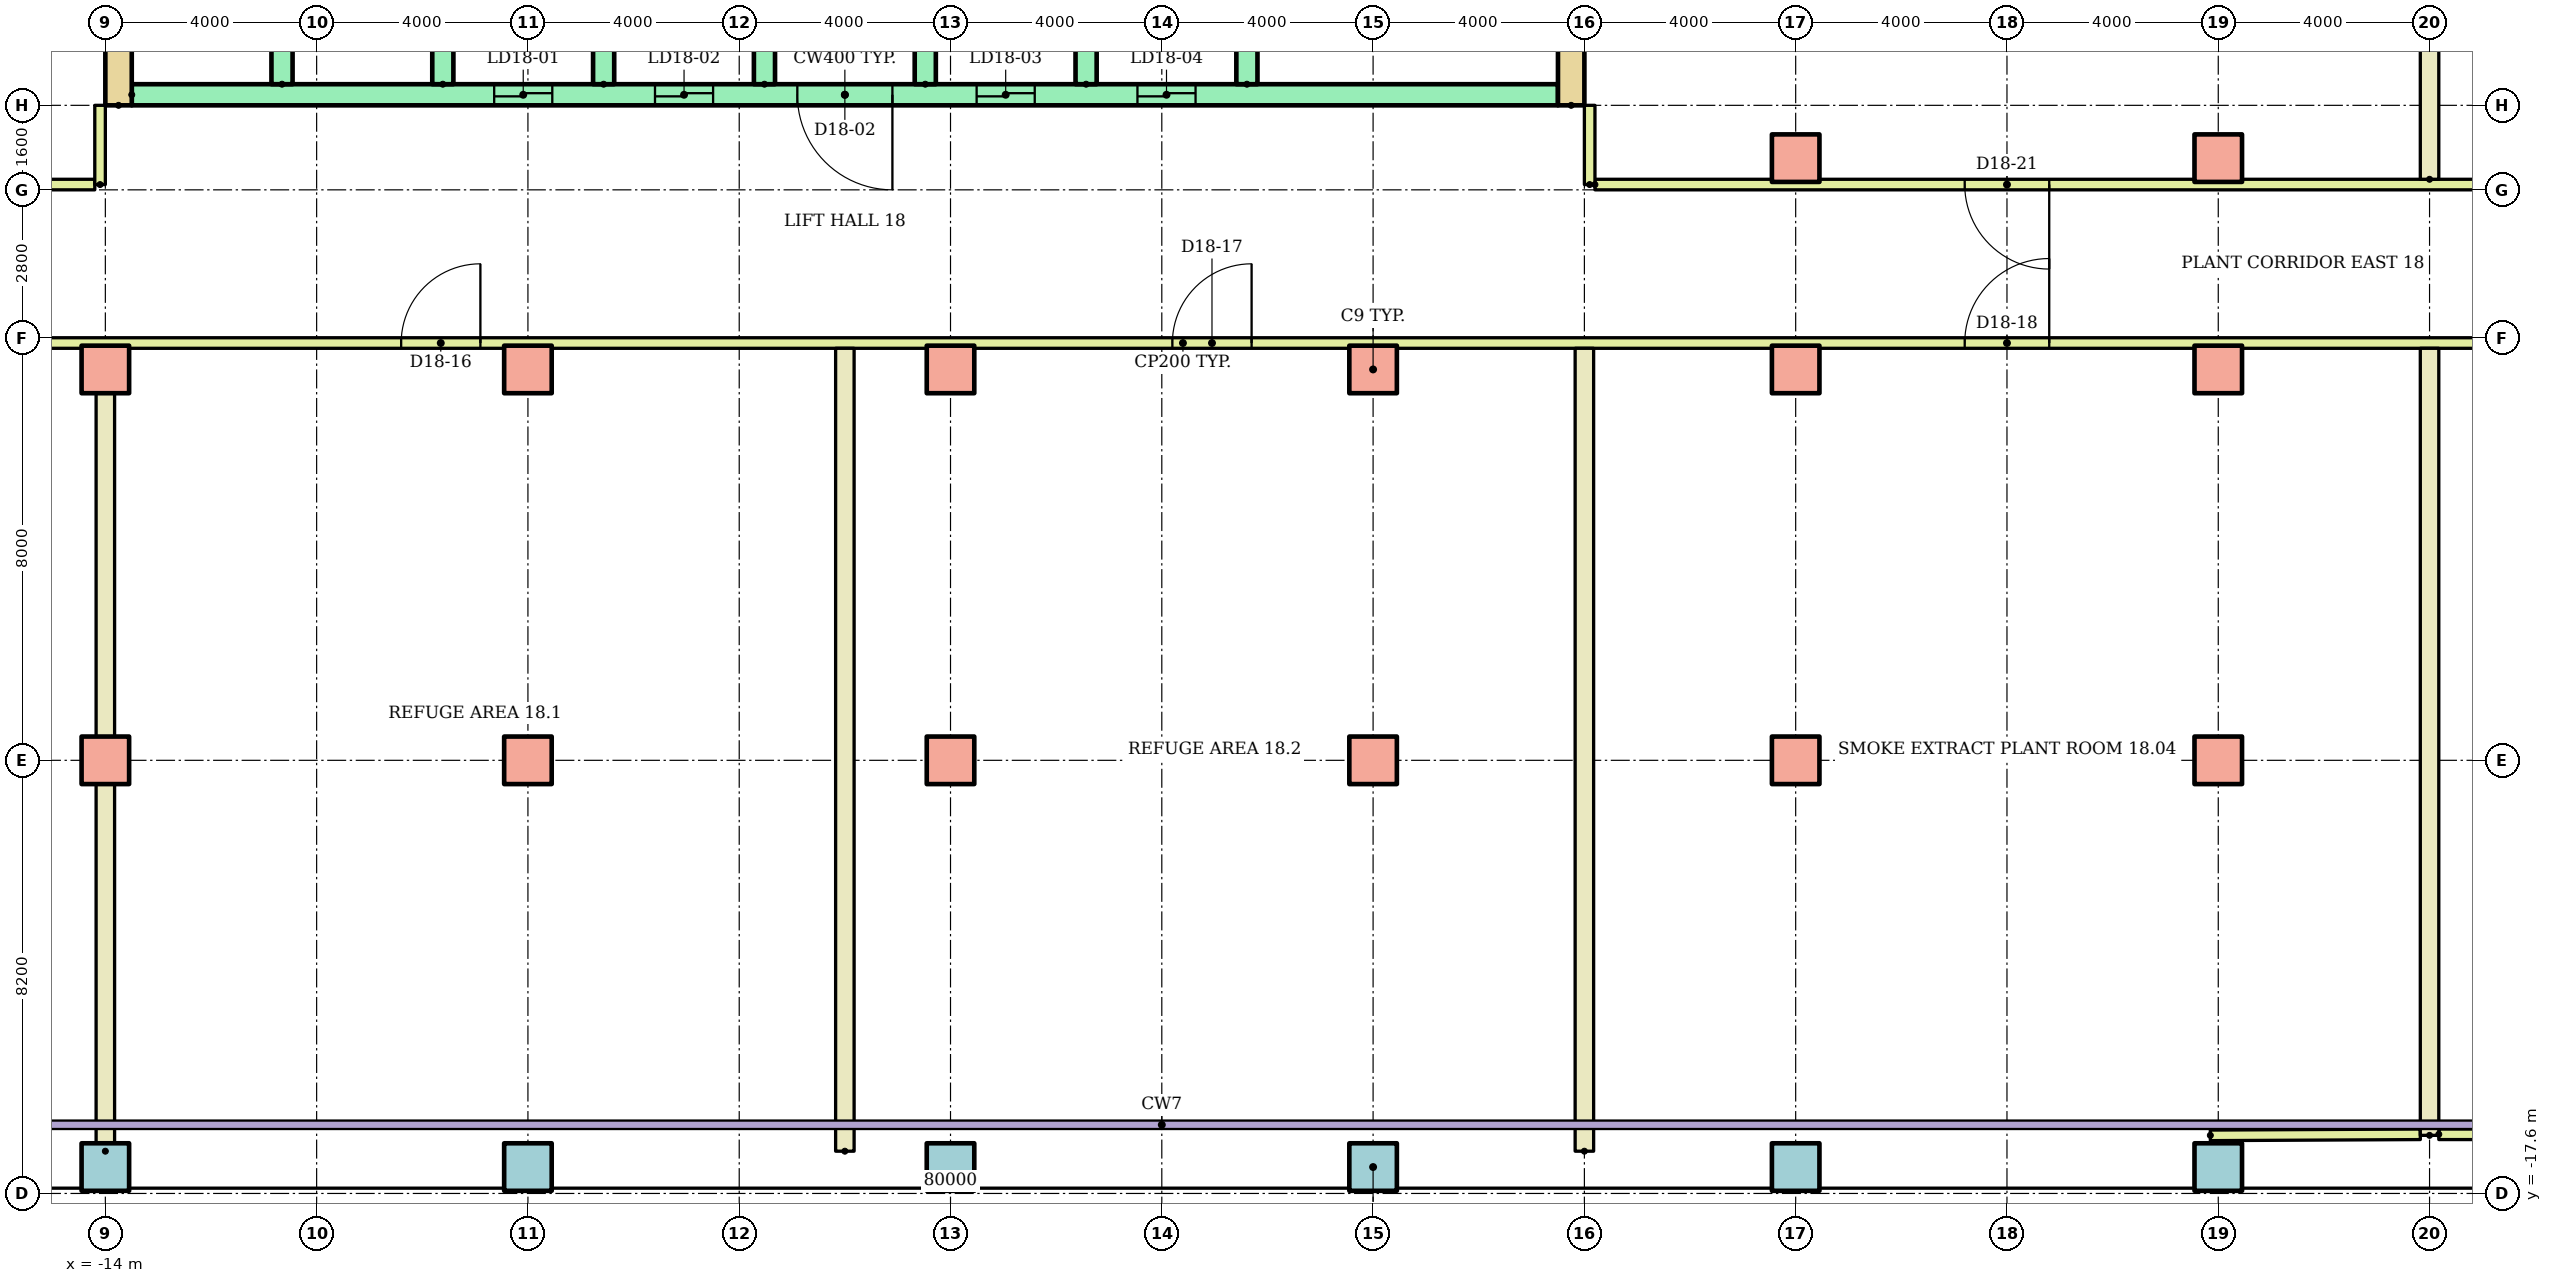
"""IFC4 building model, lengths in metres.
Left out: names, types, materials, properties, quantities, classifications, styles, units other than length and angle.
Written with IfcOpenShell. Run it as: python <this file> out.ifc"""

import sys

from ifc_helpers import new_model, si_unit, direction, frame, frame_2d, origin, origin_2d, place, context, subcontext, project, spatial, rectangle, hollow_rectangle, extrude, element, fill, save


model = new_model("IFC4")
c1 = context("Model", 3, precision=1e-05, world=origin(), true_north=direction((0.0, 1.0)))
c2 = subcontext(c1, "Body", "Model", "MODEL_VIEW")
j1 = project(units=[si_unit("LENGTHUNIT", "METRE"), si_unit("PLANEANGLEUNIT", "RADIAN")], contexts=[c1])
p1 = place(None, origin())
s1 = spatial("IfcSite", under=j1, at=p1, CompositionType="ELEMENT")
p2 = place(p1, origin())
s2 = spatial("IfcBuilding", under=s1, at=p2, CompositionType="ELEMENT")
p3 = place(p2, frame((0.0, 0.0, 73.6)))
s3 = spatial("IfcBuildingStorey", under=s2, at=p3, CompositionType="ELEMENT", Elevation=73.6)
for number, where in (
    (1, (-14.0, -17.1, 0.0)),
    (2, (-6.0, -17.1, 0.0)),
    (3, (2.0, -17.1, 0.0)),
    (4, (10.0, -17.1, 0.0)),
    (5, (18.0, -17.1, 0.0)),
    (6, (26.0, -17.1, 0.0)),
):
    element("IfcColumn", number, at=place(p3, frame(where)), inside=s3, PredefinedType="COLUMN", context=c2, shape_type="SweptSolid", body=[
        extrude(hollow_rectangle(XDim=0.9, YDim=0.9, WallThickness=0.045, at=origin_2d()), origin(), (0.0, 0.0, 1.0), 3.9),
    ])
for number, where in (
    (7, (-14.0, -9.4, 0.0)),
    (8, (-6.0, -9.4, 0.0)),
    (9, (2.0, -9.4, 0.0)),
    (10, (10.0, -9.4, 0.0)),
    (11, (18.0, -9.4, 0.0)),
    (12, (26.0, -9.4, 0.0)),
    (13, (-14.0, -2.0, 0.0)),
    (14, (-6.0, -2.0, 0.0)),
    (15, (2.0, -2.0, 0.0)),
    (16, (10.0, -2.0, 0.0)),
    (17, (18.0, -2.0, 0.0)),
    (18, (26.0, -2.0, 0.0)),
    (19, (18.0, 2.0, 0.0)),
    (20, (26.0, 2.0, 0.0)),
):
    element("IfcColumn", number, at=place(p3, frame(where)), inside=s3, PredefinedType="COLUMN", context=c2, shape_type="SweptSolid", body=[
        extrude(rectangle(XDim=0.9, YDim=0.9, at=origin_2d()), origin(), (0.0, 0.0, 1.0), 3.9),
    ])
for number, where, z_axis, x_axis in (
    (21, (-13.75, 3.0, 0.0), (0.0, 0.0, 1.0), (0.0, 1.0, 0.0)),
    (22, (13.75, 3.0, 0.0), (0.0, 0.0, 1.0), (0.0, 1.0, 0.0)),
):
    element("IfcWall", number, at=place(p3, frame(where, z_axis=z_axis, x_axis=x_axis)), inside=s3, PredefinedType="SHEAR", context=c2, shape_type="SweptSolid", body=[
        extrude(rectangle(XDim=17.0, YDim=0.5, at=frame_2d((8.5, 0.0))), origin(), (0.0, 0.0, 1.0), 3.62),
    ])
p4 = place(p3, frame((-13.5, 3.2, 0.0)))
e23 = element("IfcWall", 23, at=p4, inside=s3, PredefinedType="SHEAR", context=c2, shape_type="SweptSolid", body=[
    extrude(rectangle(XDim=27.0, YDim=0.4, at=frame_2d((13.5, 0.0))), origin(), (0.0, 0.0, 1.0), 3.62),
])
p5 = place(p4, frame((6.861, 0.0, 0.0)))
e24 = element("IfcOpeningElement", 24, at=p5, cuts=e23, PredefinedType="OPENING", context=c2, shape_type="SweptSolid", body=[
    extrude(rectangle(XDim=1.1, YDim=2.1, at=frame_2d((0.55, 1.05))), frame((0.0, 0.21, 0.0), z_axis=(0.0, -1.0, 0.0), x_axis=(1.0, 0.0, 0.0)), (0.0, 0.0, 1.0), 0.42),
])
p6 = place(p4, frame((9.906, 0.0, 0.0)))
e25 = element("IfcOpeningElement", 25, at=p6, cuts=e23, PredefinedType="OPENING", context=c2, shape_type="SweptSolid", body=[
    extrude(rectangle(XDim=1.1, YDim=2.1, at=frame_2d((0.55, 1.05))), frame((0.0, 0.21, 0.0), z_axis=(0.0, -1.0, 0.0), x_axis=(1.0, 0.0, 0.0)), (0.0, 0.0, 1.0), 0.42),
])
p7 = place(p4, frame((15.994, 0.0, 0.0)))
e26 = element("IfcOpeningElement", 26, at=p7, cuts=e23, PredefinedType="OPENING", context=c2, shape_type="SweptSolid", body=[
    extrude(rectangle(XDim=1.1, YDim=2.1, at=frame_2d((0.55, 1.05))), frame((0.0, 0.21, 0.0), z_axis=(0.0, -1.0, 0.0), x_axis=(1.0, 0.0, 0.0)), (0.0, 0.0, 1.0), 0.42),
])
p8 = place(p4, frame((19.039, 0.0, 0.0)))
e27 = element("IfcOpeningElement", 27, at=p8, cuts=e23, PredefinedType="OPENING", context=c2, shape_type="SweptSolid", body=[
    extrude(rectangle(XDim=1.1, YDim=2.1, at=frame_2d((0.55, 1.05))), frame((0.0, 0.21, 0.0), z_axis=(0.0, -1.0, 0.0), x_axis=(1.0, 0.0, 0.0)), (0.0, 0.0, 1.0), 0.42),
])
p9 = place(p4, frame((12.6, 0.0, 0.0)))
e28 = element("IfcOpeningElement", 28, at=p9, cuts=e23, PredefinedType="OPENING", context=c2, shape_type="SweptSolid", body=[
    extrude(rectangle(XDim=1.8, YDim=2.1, at=frame_2d((0.9, 1.05))), frame((0.0, 0.21, 0.0), z_axis=(0.0, -1.0, 0.0), x_axis=(1.0, 0.0, 0.0)), (0.0, 0.0, 1.0), 0.42),
])
for number, where, z_axis, x_axis in (
    (29, (-10.656, 3.4, 0.0), (0.0, 0.0, 1.0), (0.0, 1.0, 0.0)),
    (30, (-7.611, 3.4, 0.0), (0.0, 0.0, 1.0), (0.0, 1.0, 0.0)),
    (31, (-4.567, 3.4, 0.0), (0.0, 0.0, 1.0), (0.0, 1.0, 0.0)),
    (32, (-1.522, 3.4, 0.0), (0.0, 0.0, 1.0), (0.0, 1.0, 0.0)),
    (33, (1.522, 3.4, 0.0), (0.0, 0.0, 1.0), (0.0, 1.0, 0.0)),
    (34, (4.567, 3.4, 0.0), (0.0, 0.0, 1.0), (0.0, 1.0, 0.0)),
    (35, (7.611, 3.4, 0.0), (0.0, 0.0, 1.0), (0.0, 1.0, 0.0)),
):
    element("IfcWall", number, at=place(p3, frame(where, z_axis=z_axis, x_axis=x_axis)), inside=s3, PredefinedType="SHEAR", context=c2, shape_type="SweptSolid", body=[
        extrude(rectangle(XDim=3.0, YDim=0.4, at=frame_2d((1.5, 0.0))), origin(), (0.0, 0.0, 1.0), 3.62),
    ])
p10 = place(p3, frame((-28.4, -1.5, 0.0)))
e36 = element("IfcWall", 36, at=p10, inside=s3, PredefinedType="PARTITIONING", context=c2, shape_type="SweptSolid", body=[
    extrude(rectangle(XDim=69.6, YDim=0.2, at=frame_2d((34.8, 0.0))), origin(), (0.0, 0.0, 1.0), 3.62),
])
p11 = place(p10, frame((7.2, 0.0, 0.0)))
e37 = element("IfcOpeningElement", 37, at=p11, cuts=e36, PredefinedType="OPENING", context=c2, shape_type="SweptSolid", body=[
    extrude(rectangle(XDim=1.0, YDim=2.4, at=frame_2d((0.5, 1.2))), frame((0.0, 0.11, 0.0), z_axis=(0.0, -1.0, 0.0), x_axis=(1.0, 0.0, 0.0)), (0.0, 0.0, 1.0), 0.22),
])
p12 = place(p10, frame((20.0, 0.0, 0.0)))
e38 = element("IfcOpeningElement", 38, at=p12, cuts=e36, PredefinedType="OPENING", context=c2, shape_type="SweptSolid", body=[
    extrude(rectangle(XDim=1.5, YDim=2.1, at=frame_2d((0.75, 1.05))), frame((0.0, 0.11, 0.0), z_axis=(0.0, -1.0, 0.0), x_axis=(1.0, 0.0, 0.0)), (0.0, 0.0, 1.0), 0.22),
])
p13 = place(p10, frame((34.6, 0.0, 0.0)))
e39 = element("IfcOpeningElement", 39, at=p13, cuts=e36, PredefinedType="OPENING", context=c2, shape_type="SweptSolid", body=[
    extrude(rectangle(XDim=1.5, YDim=2.1, at=frame_2d((0.75, 1.05))), frame((0.0, 0.11, 0.0), z_axis=(0.0, -1.0, 0.0), x_axis=(1.0, 0.0, 0.0)), (0.0, 0.0, 1.0), 0.22),
])
p14 = place(p10, frame((49.6, 0.0, 0.0)))
e40 = element("IfcOpeningElement", 40, at=p14, cuts=e36, PredefinedType="OPENING", context=c2, shape_type="SweptSolid", body=[
    extrude(rectangle(XDim=1.6, YDim=2.4, at=frame_2d((0.8, 1.2))), frame((0.0, 0.11, 0.0), z_axis=(0.0, -1.0, 0.0), x_axis=(1.0, 0.0, 0.0)), (0.0, 0.0, 1.0), 0.22),
])
p15 = place(p10, frame((63.2, 0.0, 0.0)))
e41 = element("IfcOpeningElement", 41, at=p15, cuts=e36, PredefinedType="OPENING", context=c2, shape_type="SweptSolid", body=[
    extrude(rectangle(XDim=1.6, YDim=2.4, at=frame_2d((0.8, 1.2))), frame((0.0, 0.11, 0.0), z_axis=(0.0, -1.0, 0.0), x_axis=(1.0, 0.0, 0.0)), (0.0, 0.0, 1.0), 0.22),
])
p16 = place(p3, frame((-28.4, 1.5, 0.0)))
e42 = element("IfcWall", 42, at=p16, inside=s3, PredefinedType="PARTITIONING", context=c2, shape_type="SweptSolid", body=[
    extrude(rectangle(XDim=14.2, YDim=0.2, at=frame_2d((7.1, 0.0))), origin(), (0.0, 0.0, 1.0), 3.62),
])
p17 = place(p16, frame((7.2, 0.0, 0.0)))
e43 = element("IfcOpeningElement", 43, at=p17, cuts=e42, PredefinedType="OPENING", context=c2, shape_type="SweptSolid", body=[
    extrude(rectangle(XDim=1.0, YDim=2.4, at=frame_2d((0.5, 1.2))), frame((0.0, 0.11, 0.0), z_axis=(0.0, -1.0, 0.0), x_axis=(1.0, 0.0, 0.0)), (0.0, 0.0, 1.0), 0.22),
])
p18 = place(p3, frame((14.2, 1.5, 0.0)))
e44 = element("IfcWall", 44, at=p18, inside=s3, PredefinedType="PARTITIONING", context=c2, shape_type="SweptSolid", body=[
    extrude(rectangle(XDim=27.0, YDim=0.2, at=frame_2d((13.5, 0.0))), origin(), (0.0, 0.0, 1.0), 3.62),
])
p19 = place(p18, frame((7.0, 0.0, 0.0)))
e45 = element("IfcOpeningElement", 45, at=p19, cuts=e44, PredefinedType="OPENING", context=c2, shape_type="SweptSolid", body=[
    extrude(rectangle(XDim=1.6, YDim=2.4, at=frame_2d((0.8, 1.2))), frame((0.0, 0.11, 0.0), z_axis=(0.0, -1.0, 0.0), x_axis=(1.0, 0.0, 0.0)), (0.0, 0.0, 1.0), 0.22),
])
p20 = place(p18, frame((20.6, 0.0, 0.0)))
e46 = element("IfcOpeningElement", 46, at=p20, cuts=e44, PredefinedType="OPENING", context=c2, shape_type="SweptSolid", body=[
    extrude(rectangle(XDim=1.6, YDim=2.4, at=frame_2d((0.8, 1.2))), frame((0.0, 0.11, 0.0), z_axis=(0.0, -1.0, 0.0), x_axis=(1.0, 0.0, 0.0)), (0.0, 0.0, 1.0), 0.22),
])
for number, where, z_axis, x_axis in (
    (47, (-14.1, 1.5, 0.0), (0.0, 0.0, 1.0), (0.0, 1.0, 0.0)),
    (48, (14.1, 1.5, 0.0), (0.0, 0.0, 1.0), (0.0, 1.0, 0.0)),
):
    element("IfcWall", number, at=place(p3, frame(where, z_axis=z_axis, x_axis=x_axis)), inside=s3, PredefinedType="PARTITIONING", context=c2, shape_type="SweptSolid", body=[
        extrude(rectangle(XDim=1.5, YDim=0.2, at=frame_2d((0.75, 0.0))), origin(), (0.0, 0.0, 1.0), 3.62),
    ])
p21 = place(p3, frame((25.85, -16.5, 0.0), z_axis=(0.0, 0.0, 1.0), x_axis=(0.999987316845, 0.005036481787, 0.0)))
e49 = element("IfcWall", 49, at=p21, inside=s3, PredefinedType="PARTITIONING", context=c2, shape_type="SweptSolid", body=[
    extrude(rectangle(XDim=3.975, YDim=0.2, at=frame_2d((1.987, 0.0))), origin(), (0.0, 0.0, 1.0), 3.62),
])
p22 = place(p3, frame((30.175, -16.48, 0.0)))
e50 = element("IfcWall", 50, at=p22, inside=s3, PredefinedType="PARTITIONING", context=c2, shape_type="SweptSolid", body=[
    extrude(rectangle(XDim=6.525, YDim=0.2, at=frame_2d((3.262, 0.0))), origin(), (0.0, 0.0, 1.0), 3.62),
])
for number, where, z_axis, x_axis in (
    (51, (-14.0, -16.8, 0.0), (0.0, 0.0, 1.0), (0.0, 1.0, 0.0)),
    (52, (0.0, -16.8, 0.0), (0.0, 0.0, 1.0), (0.0, 1.0, 0.0)),
    (53, (14.0, -16.8, 0.0), (0.0, 0.0, 1.0), (0.0, 1.0, 0.0)),
):
    element("IfcWall", number, at=place(p3, frame(where, z_axis=z_axis, x_axis=x_axis)), inside=s3, PredefinedType="PARTITIONING", context=c2, shape_type="SweptSolid", body=[
        extrude(rectangle(XDim=15.2, YDim=0.35, at=frame_2d((7.6, 0.0))), origin(), (0.0, 0.0, 1.0), 3.62),
    ])
p23 = place(p3, frame((30.0, -16.5, 0.0), z_axis=(0.0, 0.0, 1.0), x_axis=(0.0, 1.0, 0.0)))
e54 = element("IfcWall", 54, at=p23, inside=s3, PredefinedType="PARTITIONING", context=c2, shape_type="SweptSolid", body=[
    extrude(rectangle(XDim=14.9, YDim=0.35, at=frame_2d((7.45, 0.0))), origin(), (0.0, 0.0, 1.0), 3.62),
])
p24 = place(p3, frame((30.0, 1.6, 0.0), z_axis=(0.0, 0.0, 1.0), x_axis=(0.0, 1.0, 0.0)))
e55 = element("IfcWall", 55, at=p24, inside=s3, PredefinedType="PARTITIONING", context=c2, shape_type="SweptSolid", body=[
    extrude(rectangle(XDim=17.3, YDim=0.35, at=frame_2d((8.65, 0.0))), origin(), (0.0, 0.0, 1.0), 3.62),
])
p25 = place(p5, origin())
e56 = element("IfcDoor", 56, at=p25, inside=s3, OperationType="SLIDING_TO_LEFT", PredefinedType="DOOR", context=c2, shape_type="SweptSolid", body=[
    extrude(rectangle(XDim=1.1, YDim=2.1, at=frame_2d((0.55, 1.05))), frame((0.0, 0.025, 0.0), z_axis=(0.0, -1.0, 0.0), x_axis=(1.0, 0.0, 0.0)), (0.0, 0.0, 1.0), 0.05),
])
fill(e24, e56)
p26 = place(p6, origin())
e57 = element("IfcDoor", 57, at=p26, inside=s3, OperationType="SLIDING_TO_LEFT", PredefinedType="DOOR", context=c2, shape_type="SweptSolid", body=[
    extrude(rectangle(XDim=1.1, YDim=2.1, at=frame_2d((0.55, 1.05))), frame((0.0, 0.025, 0.0), z_axis=(0.0, -1.0, 0.0), x_axis=(1.0, 0.0, 0.0)), (0.0, 0.0, 1.0), 0.05),
])
fill(e25, e57)
p27 = place(p7, origin())
e58 = element("IfcDoor", 58, at=p27, inside=s3, OperationType="SLIDING_TO_LEFT", PredefinedType="DOOR", context=c2, shape_type="SweptSolid", body=[
    extrude(rectangle(XDim=1.1, YDim=2.1, at=frame_2d((0.55, 1.05))), frame((0.0, 0.025, 0.0), z_axis=(0.0, -1.0, 0.0), x_axis=(1.0, 0.0, 0.0)), (0.0, 0.0, 1.0), 0.05),
])
fill(e26, e58)
p28 = place(p8, origin())
e59 = element("IfcDoor", 59, at=p28, inside=s3, OperationType="SLIDING_TO_LEFT", PredefinedType="DOOR", context=c2, shape_type="SweptSolid", body=[
    extrude(rectangle(XDim=1.1, YDim=2.1, at=frame_2d((0.55, 1.05))), frame((0.0, 0.025, 0.0), z_axis=(0.0, -1.0, 0.0), x_axis=(1.0, 0.0, 0.0)), (0.0, 0.0, 1.0), 0.05),
])
fill(e27, e59)
p29 = place(p9, frame((1.8, 0.0, 0.0), z_axis=(0.0, 0.0, 1.0), x_axis=(-1.0, 0.0, 0.0)))
e60 = element("IfcDoor", 60, at=p29, inside=s3, OperationType="DOUBLE_DOOR_SINGLE_SWING", PredefinedType="DOOR", context=c2, shape_type="SweptSolid", body=[
    extrude(rectangle(XDim=1.8, YDim=2.1, at=frame_2d((0.9, 1.05))), frame((0.0, 0.025, 0.0), z_axis=(0.0, -1.0, 0.0), x_axis=(1.0, 0.0, 0.0)), (0.0, 0.0, 1.0), 0.05),
])
fill(e28, e60)
p30 = place(p12, origin())
e61 = element("IfcDoor", 61, at=p30, inside=s3, OperationType="DOUBLE_DOOR_SINGLE_SWING", PredefinedType="DOOR", context=c2, shape_type="SweptSolid", body=[
    extrude(rectangle(XDim=1.5, YDim=2.1, at=frame_2d((0.75, 1.05))), frame((0.0, 0.025, 0.0), z_axis=(0.0, -1.0, 0.0), x_axis=(1.0, 0.0, 0.0)), (0.0, 0.0, 1.0), 0.05),
])
fill(e38, e61)
p31 = place(p13, origin())
e62 = element("IfcDoor", 62, at=p31, inside=s3, OperationType="DOUBLE_DOOR_SINGLE_SWING", PredefinedType="DOOR", context=c2, shape_type="SweptSolid", body=[
    extrude(rectangle(XDim=1.5, YDim=2.1, at=frame_2d((0.75, 1.05))), frame((0.0, 0.025, 0.0), z_axis=(0.0, -1.0, 0.0), x_axis=(1.0, 0.0, 0.0)), (0.0, 0.0, 1.0), 0.05),
])
fill(e39, e62)
p32 = place(p14, origin())
e63 = element("IfcDoor", 63, at=p32, inside=s3, OperationType="DOUBLE_DOOR_SINGLE_SWING", PredefinedType="DOOR", context=c2, shape_type="SweptSolid", body=[
    extrude(rectangle(XDim=1.6, YDim=2.4, at=frame_2d((0.8, 1.2))), frame((0.0, 0.025, 0.0), z_axis=(0.0, -1.0, 0.0), x_axis=(1.0, 0.0, 0.0)), (0.0, 0.0, 1.0), 0.05),
])
fill(e40, e63)
p33 = place(p19, frame((1.6, 0.0, 0.0), z_axis=(0.0, 0.0, 1.0), x_axis=(-1.0, 0.0, 0.0)))
e64 = element("IfcDoor", 64, at=p33, inside=s3, OperationType="DOUBLE_DOOR_SINGLE_SWING", PredefinedType="DOOR", context=c2, shape_type="SweptSolid", body=[
    extrude(rectangle(XDim=1.6, YDim=2.4, at=frame_2d((0.8, 1.2))), frame((0.0, 0.025, 0.0), z_axis=(0.0, -1.0, 0.0), x_axis=(1.0, 0.0, 0.0)), (0.0, 0.0, 1.0), 0.05),
])
fill(e45, e64)
save(model, sys.argv[1])
